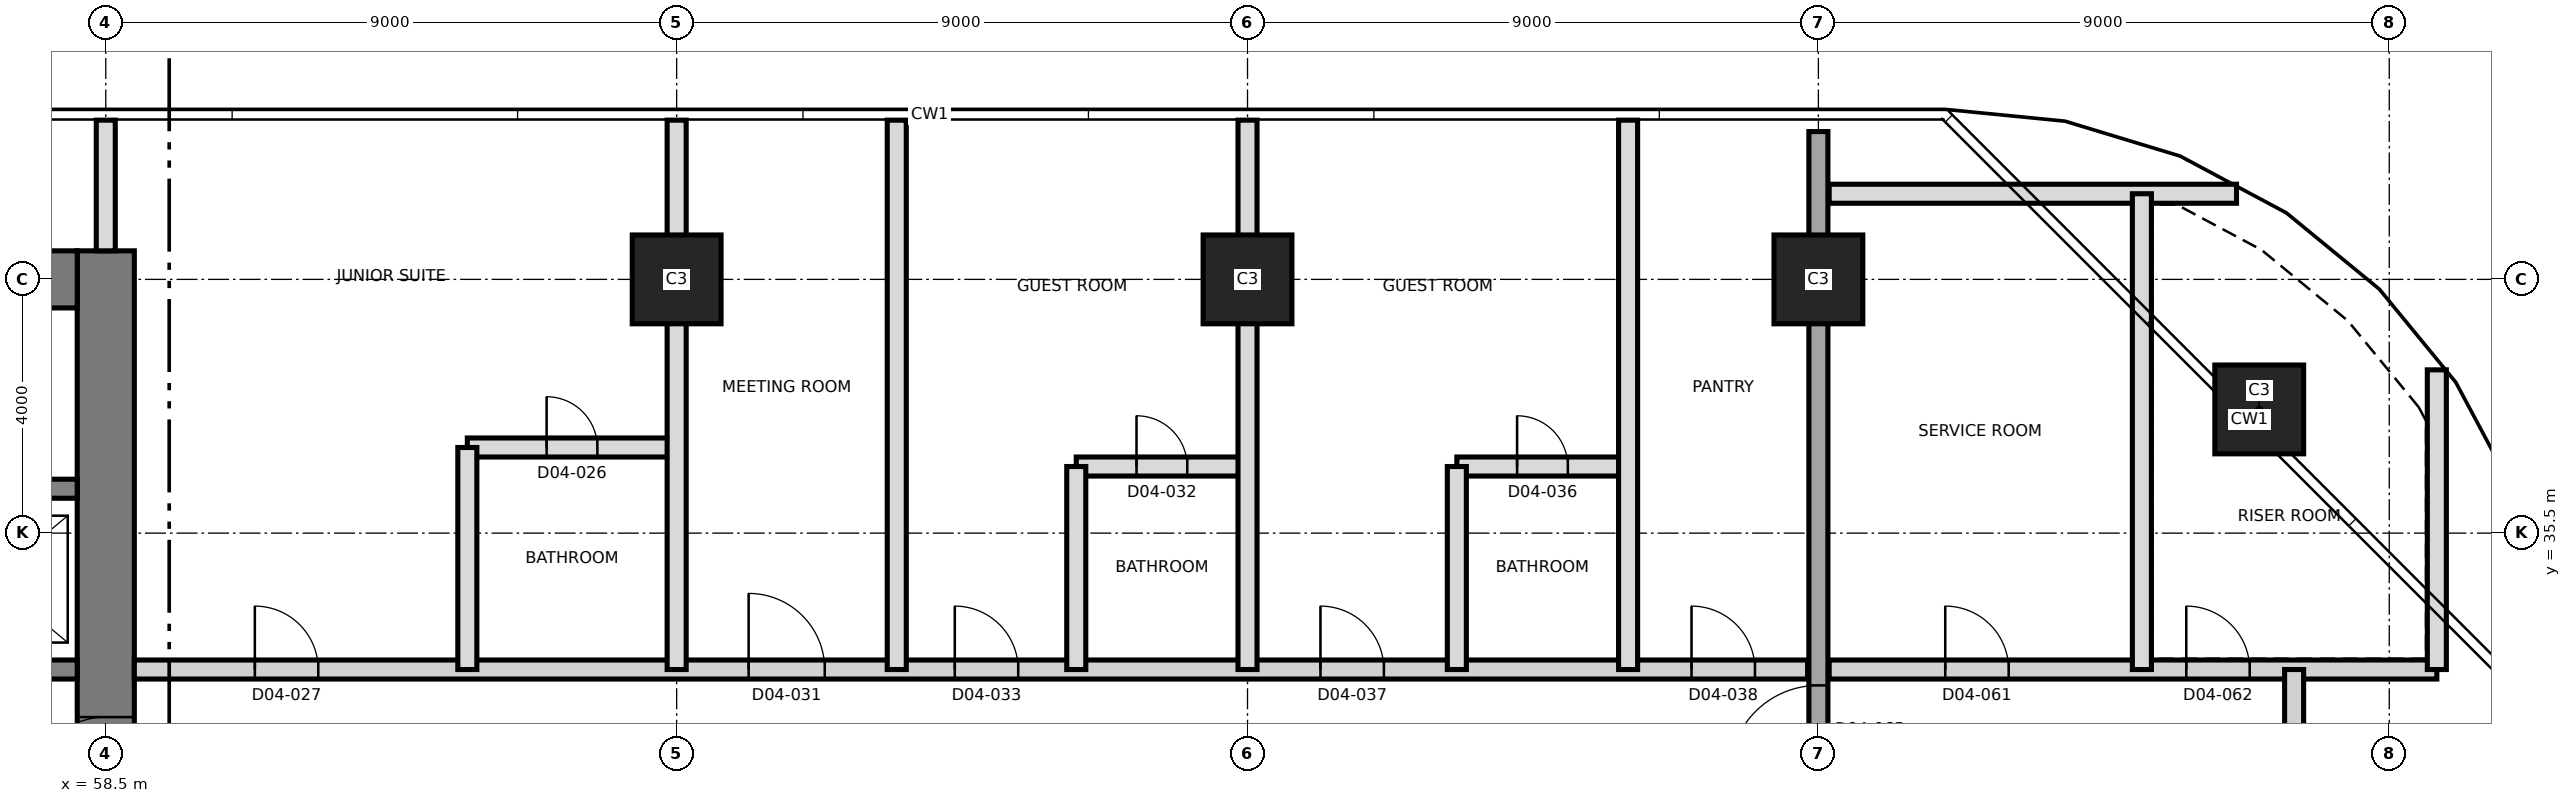
"""IFC4 building model, lengths in metres.
Left out: names, types, materials, properties, quantities, classifications, styles, units other than length and angle.
Written with IfcOpenShell. Run it as: python <this file> out.ifc"""

import sys

from ifc_helpers import new_model, si_unit, direction, frame, frame_2d, origin, origin_2d, place, context, subcontext, project, spatial, rectangle, extrude, element, fill, save


model = new_model("IFC4")
c1 = context("Model", 3, precision=1e-05, world=origin(), true_north=direction((0.0, 1.0)))
c2 = subcontext(c1, "Body", "Model", "MODEL_VIEW")
j1 = project(units=[si_unit("LENGTHUNIT", "METRE"), si_unit("PLANEANGLEUNIT", "RADIAN")], contexts=[c1])
p1 = place(None, origin())
s1 = spatial("IfcSite", under=j1, at=p1, CompositionType="ELEMENT")
p2 = place(p1, origin())
s2 = spatial("IfcBuilding", under=s1, at=p2, CompositionType="ELEMENT")
p3 = place(p2, frame((0.0, 0.0, 63.1)))
s3 = spatial("IfcBuildingStorey", under=s2, at=p3, CompositionType="ELEMENT", Elevation=63.1)
p4 = place(p3, frame((58.5, 21.05, 0.0), z_axis=(0.0, 0.0, 1.0), x_axis=(0.0, 1.0, 0.0)))
e1 = element("IfcWall", 1, at=p4, inside=s3, PredefinedType="SHEAR", context=c2, shape_type="SweptSolid", body=[
    extrude(rectangle(XDim=18.9, YDim=0.9, at=frame_2d((9.45, 0.0))), origin(), (0.0, 0.0, 1.0), 3.7),
])
p5 = place(p4, frame((10.35, 0.0, 0.0)))
e2 = element("IfcOpeningElement", 2, at=p5, cuts=e1, PredefinedType="OPENING", context=c2, shape_type="SweptSolid", body=[
    extrude(rectangle(XDim=1.2, YDim=2.1, at=frame_2d((0.6, 1.05))), frame((0.0, 0.46, 0.0), z_axis=(0.0, -1.0, 0.0), x_axis=(1.0, 0.0, 0.0)), (0.0, 0.0, 1.0), 0.92),
])
p6 = place(p3, frame((31.05, 39.5, 0.0), z_axis=(0.0, 0.0, 1.0), x_axis=(1.0, 0.0, 0.0)))
e3 = element("IfcWall", 3, at=p6, inside=s3, PredefinedType="SHEAR", context=c2, shape_type="SweptSolid", body=[
    extrude(rectangle(XDim=27.0, YDim=0.9, at=frame_2d((13.5, 0.0))), origin(), (0.0, 0.0, 1.0), 3.7),
])
p7 = place(p6, frame((10.65, 0.0, 0.0)))
e4 = element("IfcOpeningElement", 4, at=p7, cuts=e3, PredefinedType="OPENING", context=c2, shape_type="SweptSolid", body=[
    extrude(rectangle(XDim=1.2, YDim=2.1, at=frame_2d((0.6, 1.05))), frame((0.0, 0.46, 0.0), z_axis=(0.0, -1.0, 0.0), x_axis=(1.0, 0.0, 0.0)), (0.0, 0.0, 1.0), 0.92),
])
p8 = place(p3, frame((31.95, 33.35, 0.0), z_axis=(0.0, 0.0, 1.0), x_axis=(1.0, 0.0, 0.0)))
e5 = element("IfcWall", 5, at=p8, inside=s3, PredefinedType="SHEAR", context=c2, shape_type="SweptSolid", body=[
    extrude(rectangle(XDim=26.1, YDim=0.3, at=frame_2d((13.05, 0.0))), origin(), (0.0, 0.0, 1.0), 3.7),
])
p9 = place(p8, frame((13.7, 0.0, 0.0)))
e6 = element("IfcOpeningElement", 6, at=p9, cuts=e5, PredefinedType="OPENING", context=c2, shape_type="SweptSolid", body=[
    extrude(rectangle(XDim=1.4, YDim=2.1, at=frame_2d((0.7, 1.05))), frame((0.0, 0.16, 0.0), z_axis=(0.0, -1.0, 0.0), x_axis=(1.0, 0.0, 0.0)), (0.0, 0.0, 1.0), 0.32),
])
p10 = place(p8, frame((5.175, 0.0, 0.0)))
e7 = element("IfcOpeningElement", 7, at=p10, cuts=e5, PredefinedType="OPENING", context=c2, shape_type="SweptSolid", body=[
    extrude(rectangle(XDim=1.2, YDim=2.1, at=frame_2d((0.6, 1.05))), frame((0.0, 0.16, 0.0), z_axis=(0.0, -1.0, 0.0), x_axis=(1.0, 0.0, 0.0)), (0.0, 0.0, 1.0), 0.32),
])
p11 = place(p8, frame((19.725, 0.0, 0.0)))
e8 = element("IfcOpeningElement", 8, at=p11, cuts=e5, PredefinedType="OPENING", context=c2, shape_type="SweptSolid", body=[
    extrude(rectangle(XDim=1.2, YDim=2.1, at=frame_2d((0.6, 1.05))), frame((0.0, 0.16, 0.0), z_axis=(0.0, -1.0, 0.0), x_axis=(1.0, 0.0, 0.0)), (0.0, 0.0, 1.0), 0.32),
])
p12 = place(p3, frame((43.5, 36.2, 0.0), z_axis=(0.0, 0.0, 1.0), x_axis=(1.0, 0.0, 0.0)))
e9 = element("IfcWall", 9, at=p12, inside=s3, PredefinedType="SHEAR", context=c2, shape_type="SweptSolid", body=[
    extrude(rectangle(XDim=14.55, YDim=0.3, at=frame_2d((7.275, 0.0))), origin(), (0.0, 0.0, 1.0), 3.7),
])
p13 = place(p12, frame((6.9, 0.0, 0.0)))
e10 = element("IfcOpeningElement", 10, at=p13, cuts=e9, PredefinedType="OPENING", context=c2, shape_type="SweptSolid", body=[
    extrude(rectangle(XDim=1.2, YDim=2.1, at=frame_2d((0.6, 1.05))), frame((0.0, 0.16, 0.0), z_axis=(0.0, -1.0, 0.0), x_axis=(1.0, 0.0, 0.0)), (0.0, 0.0, 1.0), 0.32),
])
p14 = place(p12, frame((0.7, 0.0, 0.0)))
e11 = element("IfcOpeningElement", 11, at=p14, cuts=e9, PredefinedType="OPENING", context=c2, shape_type="SweptSolid", body=[
    extrude(rectangle(XDim=1.3, YDim=2.4, at=frame_2d((0.65, 1.2))), frame((0.0, 0.16, 0.0), z_axis=(0.0, -1.0, 0.0), x_axis=(1.0, 0.0, 0.0)), (0.0, 0.0, 1.0), 0.32),
])
p15 = place(p12, frame((3.7, 0.0, 0.0)))
e12 = element("IfcOpeningElement", 12, at=p15, cuts=e9, PredefinedType="OPENING", context=c2, shape_type="SweptSolid", body=[
    extrude(rectangle(XDim=1.3, YDim=2.4, at=frame_2d((0.65, 1.2))), frame((0.0, 0.16, 0.0), z_axis=(0.0, -1.0, 0.0), x_axis=(1.0, 0.0, 0.0)), (0.0, 0.0, 1.0), 0.32),
])
for number, where, z_axis, x_axis in (
    (13, (92.45, 37.45, 0.0), (0.0, 0.0, 1.0), (1.0, 0.0, 0.0)),
    (14, (67.5, 39.5, 0.0), (0.0, 0.0, 1.0), (1.0, 0.0, 0.0)),
    (15, (76.5, 39.5, 0.0), (0.0, 0.0, 1.0), (1.0, 0.0, 0.0)),
    (16, (85.5, 39.5, 0.0), (0.0, 0.0, 1.0), (1.0, 0.0, 0.0)),
):
    element("IfcColumn", number, at=place(p3, frame(where, z_axis=z_axis, x_axis=x_axis)), inside=s3, PredefinedType="COLUMN", context=c2, shape_type="SweptSolid", body=[
        extrude(rectangle(XDim=1.4, YDim=1.4, at=origin_2d()), origin(), (0.0, 0.0, 1.0), 3.7),
    ])
p16 = place(p3, frame((85.5, 19.17, 0.0), z_axis=(0.0, 0.0, 1.0), x_axis=(0.0, 1.0, 0.0)))
e17 = element("IfcWall", 17, at=p16, inside=s3, PredefinedType="SHEAR", context=c2, shape_type="SweptSolid", body=[
    extrude(rectangle(XDim=22.66, YDim=0.3, at=frame_2d((11.33, 0.0))), origin(), (0.0, 0.0, 1.0), 3.7),
])
p17 = place(p16, frame((12.53, 0.0, 0.0)))
e18 = element("IfcOpeningElement", 18, at=p17, cuts=e17, PredefinedType="OPENING", context=c2, shape_type="SweptSolid", body=[
    extrude(rectangle(XDim=1.4, YDim=2.1, at=frame_2d((0.7, 1.05))), frame((0.0, 0.16, 0.0), z_axis=(0.0, -1.0, 0.0), x_axis=(1.0, 0.0, 0.0)), (0.0, 0.0, 1.0), 0.32),
])
p18 = place(p3, frame((58.95, 33.35, 0.0), z_axis=(0.0, 0.0, 1.0), x_axis=(1.0, 0.0, 0.0)))
e19 = element("IfcWall", 19, at=p18, inside=s3, PredefinedType="PARTITIONING", context=c2, shape_type="SweptSolid", body=[
    extrude(rectangle(XDim=26.38, YDim=0.3, at=frame_2d((13.19, 0.0))), origin(), (0.0, 0.0, 1.0), 3.4),
])
p19 = place(p18, frame((1.9, 0.0, 0.0)))
e20 = element("IfcOpeningElement", 20, at=p19, cuts=e19, PredefinedType="OPENING", context=c2, shape_type="SweptSolid", body=[
    extrude(rectangle(XDim=1.0, YDim=2.4, at=frame_2d((0.5, 1.2))), frame((0.0, 0.16, 0.0), z_axis=(0.0, -1.0, 0.0), x_axis=(1.0, 0.0, 0.0)), (0.0, 0.0, 1.0), 0.32),
])
p20 = place(p18, frame((9.685, 0.0, 0.0)))
e21 = element("IfcOpeningElement", 21, at=p20, cuts=e19, PredefinedType="OPENING", context=c2, shape_type="SweptSolid", body=[
    extrude(rectangle(XDim=1.2, YDim=2.1, at=frame_2d((0.6, 1.05))), frame((0.0, 0.16, 0.0), z_axis=(0.0, -1.0, 0.0), x_axis=(1.0, 0.0, 0.0)), (0.0, 0.0, 1.0), 0.32),
])
p21 = place(p18, frame((12.935, 0.0, 0.0)))
e22 = element("IfcOpeningElement", 22, at=p21, cuts=e19, PredefinedType="OPENING", context=c2, shape_type="SweptSolid", body=[
    extrude(rectangle(XDim=1.0, YDim=2.1, at=frame_2d((0.5, 1.05))), frame((0.0, 0.16, 0.0), z_axis=(0.0, -1.0, 0.0), x_axis=(1.0, 0.0, 0.0)), (0.0, 0.0, 1.0), 0.32),
])
p22 = place(p18, frame((18.7, 0.0, 0.0)))
e23 = element("IfcOpeningElement", 23, at=p22, cuts=e19, PredefinedType="OPENING", context=c2, shape_type="SweptSolid", body=[
    extrude(rectangle(XDim=1.0, YDim=2.1, at=frame_2d((0.5, 1.05))), frame((0.0, 0.16, 0.0), z_axis=(0.0, -1.0, 0.0), x_axis=(1.0, 0.0, 0.0)), (0.0, 0.0, 1.0), 0.32),
])
p23 = place(p18, frame((24.55, 0.0, 0.0)))
e24 = element("IfcOpeningElement", 24, at=p23, cuts=e19, PredefinedType="OPENING", context=c2, shape_type="SweptSolid", body=[
    extrude(rectangle(XDim=1.0, YDim=2.1, at=frame_2d((0.5, 1.05))), frame((0.0, 0.16, 0.0), z_axis=(0.0, -1.0, 0.0), x_axis=(1.0, 0.0, 0.0)), (0.0, 0.0, 1.0), 0.32),
])
p24 = place(p3, frame((85.67, 33.35, 0.0), z_axis=(0.0, 0.0, 1.0), x_axis=(1.0, 0.0, 0.0)))
e25 = element("IfcWall", 25, at=p24, inside=s3, PredefinedType="PARTITIONING", context=c2, shape_type="SweptSolid", body=[
    extrude(rectangle(XDim=9.58, YDim=0.3, at=frame_2d((4.79, 0.0))), origin(), (0.0, 0.0, 1.0), 3.4),
])
p25 = place(p24, frame((1.83, 0.0, 0.0)))
e26 = element("IfcOpeningElement", 26, at=p25, cuts=e25, PredefinedType="OPENING", context=c2, shape_type="SweptSolid", body=[
    extrude(rectangle(XDim=1.0, YDim=2.1, at=frame_2d((0.5, 1.05))), frame((0.0, 0.16, 0.0), z_axis=(0.0, -1.0, 0.0), x_axis=(1.0, 0.0, 0.0)), (0.0, 0.0, 1.0), 0.32),
])
p26 = place(p24, frame((5.63, 0.0, 0.0)))
e27 = element("IfcOpeningElement", 27, at=p26, cuts=e25, PredefinedType="OPENING", context=c2, shape_type="SweptSolid", body=[
    extrude(rectangle(XDim=1.0, YDim=2.1, at=frame_2d((0.5, 1.05))), frame((0.0, 0.16, 0.0), z_axis=(0.0, -1.0, 0.0), x_axis=(1.0, 0.0, 0.0)), (0.0, 0.0, 1.0), 0.32),
])
p27 = place(p3, frame((73.8, 36.55, 0.0), z_axis=(0.0, 0.0, 1.0), x_axis=(1.0, 0.0, 0.0)))
e28 = element("IfcWall", 28, at=p27, inside=s3, PredefinedType="PARTITIONING", context=c2, shape_type="SweptSolid", body=[
    extrude(rectangle(XDim=2.7, YDim=0.3, at=frame_2d((1.35, 0.0))), origin(), (0.0, 0.0, 1.0), 3.4),
])
p28 = place(p27, frame((0.95, 0.0, 0.0)))
e29 = element("IfcOpeningElement", 29, at=p28, cuts=e28, PredefinedType="OPENING", context=c2, shape_type="SweptSolid", body=[
    extrude(rectangle(XDim=0.8, YDim=2.1, at=frame_2d((0.4, 1.05))), frame((0.0, 0.16, 0.0), z_axis=(0.0, -1.0, 0.0), x_axis=(1.0, 0.0, 0.0)), (0.0, 0.0, 1.0), 0.32),
])
p29 = place(p3, frame((79.8, 36.55, 0.0), z_axis=(0.0, 0.0, 1.0), x_axis=(1.0, 0.0, 0.0)))
e30 = element("IfcWall", 30, at=p29, inside=s3, PredefinedType="PARTITIONING", context=c2, shape_type="SweptSolid", body=[
    extrude(rectangle(XDim=2.7, YDim=0.3, at=frame_2d((1.35, 0.0))), origin(), (0.0, 0.0, 1.0), 3.4),
])
p30 = place(p29, frame((0.95, 0.0, 0.0)))
e31 = element("IfcOpeningElement", 31, at=p30, cuts=e30, PredefinedType="OPENING", context=c2, shape_type="SweptSolid", body=[
    extrude(rectangle(XDim=0.8, YDim=2.1, at=frame_2d((0.4, 1.05))), frame((0.0, 0.16, 0.0), z_axis=(0.0, -1.0, 0.0), x_axis=(1.0, 0.0, 0.0)), (0.0, 0.0, 1.0), 0.32),
])
p31 = place(p3, frame((64.2, 36.85, 0.0), z_axis=(0.0, 0.0, 1.0), x_axis=(1.0, 0.0, 0.0)))
e32 = element("IfcWall", 32, at=p31, inside=s3, PredefinedType="PARTITIONING", context=c2, shape_type="SweptSolid", body=[
    extrude(rectangle(XDim=3.3, YDim=0.3, at=frame_2d((1.65, 0.0))), origin(), (0.0, 0.0, 1.0), 3.4),
])
p32 = place(p31, frame((1.25, 0.0, 0.0)))
e33 = element("IfcOpeningElement", 33, at=p32, cuts=e32, PredefinedType="OPENING", context=c2, shape_type="SweptSolid", body=[
    extrude(rectangle(XDim=0.8, YDim=2.1, at=frame_2d((0.4, 1.05))), frame((0.0, 0.16, 0.0), z_axis=(0.0, -1.0, 0.0), x_axis=(1.0, 0.0, 0.0)), (0.0, 0.0, 1.0), 0.32),
])
p33 = place(p3, frame((85.67, 40.85, 0.0), z_axis=(0.0, 0.0, 1.0), x_axis=(1.0, 0.0, 0.0)))
e34 = element("IfcWall", 34, at=p33, inside=s3, PredefinedType="PARTITIONING", context=c2, shape_type="SweptSolid", body=[
    extrude(rectangle(XDim=6.422, YDim=0.3, at=frame_2d((3.211, 0.0))), origin(), (0.0, 0.0, 1.0), 3.4),
])
p34 = place(p3, frame((58.5, 39.95, 0.0), z_axis=(0.0, 0.0, 1.0), x_axis=(0.0, 1.0, 0.0)))
e35 = element("IfcWall", 35, at=p34, inside=s3, PredefinedType="PARTITIONING", context=c2, shape_type="SweptSolid", body=[
    extrude(rectangle(XDim=2.06, YDim=0.3, at=frame_2d((1.03, 0.0))), origin(), (0.0, 0.0, 1.0), 3.4),
])
p35 = place(p3, frame((64.2, 33.35, 0.0), z_axis=(0.0, 0.0, 1.0), x_axis=(0.0, 1.0, 0.0)))
e36 = element("IfcWall", 36, at=p35, inside=s3, PredefinedType="PARTITIONING", context=c2, shape_type="SweptSolid", body=[
    extrude(rectangle(XDim=3.5, YDim=0.3, at=frame_2d((1.75, 0.0))), origin(), (0.0, 0.0, 1.0), 3.4),
])
for number, where, z_axis, x_axis in (
    (37, (67.5, 33.35, 0.0), (0.0, 0.0, 1.0), (0.0, 1.0, 0.0)),
    (38, (70.97, 33.35, 0.0), (0.0, 0.0, 1.0), (0.0, 1.0, 0.0)),
):
    element("IfcWall", number, at=place(p3, frame(where, z_axis=z_axis, x_axis=x_axis)), inside=s3, PredefinedType="PARTITIONING", context=c2, shape_type="SweptSolid", body=[
        extrude(rectangle(XDim=8.66, YDim=0.3, at=frame_2d((4.33, 0.0))), origin(), (0.0, 0.0, 1.0), 3.4),
    ])
p36 = place(p3, frame((73.8, 33.35, 0.0), z_axis=(0.0, 0.0, 1.0), x_axis=(0.0, 1.0, 0.0)))
e39 = element("IfcWall", 39, at=p36, inside=s3, PredefinedType="PARTITIONING", context=c2, shape_type="SweptSolid", body=[
    extrude(rectangle(XDim=3.2, YDim=0.3, at=frame_2d((1.6, 0.0))), origin(), (0.0, 0.0, 1.0), 3.4),
])
p37 = place(p3, frame((76.5, 33.35, 0.0), z_axis=(0.0, 0.0, 1.0), x_axis=(0.0, 1.0, 0.0)))
e40 = element("IfcWall", 40, at=p37, inside=s3, PredefinedType="PARTITIONING", context=c2, shape_type="SweptSolid", body=[
    extrude(rectangle(XDim=8.66, YDim=0.3, at=frame_2d((4.33, 0.0))), origin(), (0.0, 0.0, 1.0), 3.4),
])
p38 = place(p3, frame((79.8, 33.35, 0.0), z_axis=(0.0, 0.0, 1.0), x_axis=(0.0, 1.0, 0.0)))
e41 = element("IfcWall", 41, at=p38, inside=s3, PredefinedType="PARTITIONING", context=c2, shape_type="SweptSolid", body=[
    extrude(rectangle(XDim=3.2, YDim=0.3, at=frame_2d((1.6, 0.0))), origin(), (0.0, 0.0, 1.0), 3.4),
])
p39 = place(p3, frame((82.5, 33.35, 0.0), z_axis=(0.0, 0.0, 1.0), x_axis=(0.0, 1.0, 0.0)))
e42 = element("IfcWall", 42, at=p39, inside=s3, PredefinedType="PARTITIONING", context=c2, shape_type="SweptSolid", body=[
    extrude(rectangle(XDim=8.66, YDim=0.3, at=frame_2d((4.33, 0.0))), origin(), (0.0, 0.0, 1.0), 3.4),
])
p40 = place(p3, frame((90.6, 33.35, 0.0), z_axis=(0.0, 0.0, 1.0), x_axis=(0.0, 1.0, 0.0)))
e43 = element("IfcWall", 43, at=p40, inside=s3, PredefinedType="PARTITIONING", context=c2, shape_type="SweptSolid", body=[
    extrude(rectangle(XDim=7.5, YDim=0.3, at=frame_2d((3.75, 0.0))), origin(), (0.0, 0.0, 1.0), 3.4),
])
p41 = place(p3, frame((93.0, 30.65, 0.0), z_axis=(0.0, 0.0, 1.0), x_axis=(0.0, 1.0, 0.0)))
e44 = element("IfcWall", 44, at=p41, inside=s3, PredefinedType="PARTITIONING", context=c2, shape_type="SweptSolid", body=[
    extrude(rectangle(XDim=2.7, YDim=0.3, at=frame_2d((1.35, 0.0))), origin(), (0.0, 0.0, 1.0), 3.4),
])
p42 = place(p3, frame((95.25, 33.35, 0.0), z_axis=(0.0, 0.0, 1.0), x_axis=(0.0, 1.0, 0.0)))
e45 = element("IfcWall", 45, at=p42, inside=s3, PredefinedType="PARTITIONING", context=c2, shape_type="SweptSolid", body=[
    extrude(rectangle(XDim=4.724, YDim=0.3, at=frame_2d((2.362, 0.0))), origin(), (0.0, 0.0, 1.0), 3.4),
])
p43 = place(p5, origin())
e46 = element("IfcDoor", 46, at=p43, inside=s3, OperationType="SINGLE_SWING_LEFT", PredefinedType="DOOR", context=c2, shape_type="SweptSolid", body=[
    extrude(rectangle(XDim=1.2, YDim=2.1, at=frame_2d((0.6, 1.05))), frame((0.0, 0.025, 0.0), z_axis=(0.0, -1.0, 0.0), x_axis=(1.0, 0.0, 0.0)), (0.0, 0.0, 1.0), 0.05),
])
fill(e2, e46)
p44 = place(p32, origin())
e47 = element("IfcDoor", 47, at=p44, inside=s3, OperationType="SINGLE_SWING_LEFT", PredefinedType="DOOR", context=c2, shape_type="SweptSolid", body=[
    extrude(rectangle(XDim=0.8, YDim=2.1, at=frame_2d((0.4, 1.05))), frame((0.0, 0.025, 0.0), z_axis=(0.0, -1.0, 0.0), x_axis=(1.0, 0.0, 0.0)), (0.0, 0.0, 1.0), 0.05),
])
fill(e33, e47)
p45 = place(p19, origin())
e48 = element("IfcDoor", 48, at=p45, inside=s3, OperationType="SINGLE_SWING_LEFT", PredefinedType="DOOR", context=c2, shape_type="SweptSolid", body=[
    extrude(rectangle(XDim=1.0, YDim=2.4, at=frame_2d((0.5, 1.2))), frame((0.0, 0.025, 0.0), z_axis=(0.0, -1.0, 0.0), x_axis=(1.0, 0.0, 0.0)), (0.0, 0.0, 1.0), 0.05),
])
fill(e20, e48)
p46 = place(p20, origin())
e49 = element("IfcDoor", 49, at=p46, inside=s3, OperationType="SINGLE_SWING_RIGHT", PredefinedType="DOOR", context=c2, shape_type="SweptSolid", body=[
    extrude(rectangle(XDim=1.2, YDim=2.1, at=frame_2d((0.6, 1.05))), frame((0.0, 0.025, 0.0), z_axis=(0.0, -1.0, 0.0), x_axis=(1.0, 0.0, 0.0)), (0.0, 0.0, 1.0), 0.05),
])
fill(e21, e49)
p47 = place(p28, origin())
e50 = element("IfcDoor", 50, at=p47, inside=s3, OperationType="SINGLE_SWING_LEFT", PredefinedType="DOOR", context=c2, shape_type="SweptSolid", body=[
    extrude(rectangle(XDim=0.8, YDim=2.1, at=frame_2d((0.4, 1.05))), frame((0.0, 0.025, 0.0), z_axis=(0.0, -1.0, 0.0), x_axis=(1.0, 0.0, 0.0)), (0.0, 0.0, 1.0), 0.05),
])
fill(e29, e50)
p48 = place(p21, origin())
e51 = element("IfcDoor", 51, at=p48, inside=s3, OperationType="SINGLE_SWING_LEFT", PredefinedType="DOOR", context=c2, shape_type="SweptSolid", body=[
    extrude(rectangle(XDim=1.0, YDim=2.1, at=frame_2d((0.5, 1.05))), frame((0.0, 0.025, 0.0), z_axis=(0.0, -1.0, 0.0), x_axis=(1.0, 0.0, 0.0)), (0.0, 0.0, 1.0), 0.05),
])
fill(e22, e51)
p49 = place(p30, origin())
e52 = element("IfcDoor", 52, at=p49, inside=s3, OperationType="SINGLE_SWING_RIGHT", PredefinedType="DOOR", context=c2, shape_type="SweptSolid", body=[
    extrude(rectangle(XDim=0.8, YDim=2.1, at=frame_2d((0.4, 1.05))), frame((0.0, 0.025, 0.0), z_axis=(0.0, -1.0, 0.0), x_axis=(1.0, 0.0, 0.0)), (0.0, 0.0, 1.0), 0.05),
])
fill(e31, e52)
p50 = place(p22, origin())
e53 = element("IfcDoor", 53, at=p50, inside=s3, OperationType="SINGLE_SWING_LEFT", PredefinedType="DOOR", context=c2, shape_type="SweptSolid", body=[
    extrude(rectangle(XDim=1.0, YDim=2.1, at=frame_2d((0.5, 1.05))), frame((0.0, 0.025, 0.0), z_axis=(0.0, -1.0, 0.0), x_axis=(1.0, 0.0, 0.0)), (0.0, 0.0, 1.0), 0.05),
])
fill(e23, e53)
p51 = place(p23, origin())
e54 = element("IfcDoor", 54, at=p51, inside=s3, OperationType="SINGLE_SWING_LEFT", PredefinedType="DOOR", context=c2, shape_type="SweptSolid", body=[
    extrude(rectangle(XDim=1.0, YDim=2.1, at=frame_2d((0.5, 1.05))), frame((0.0, 0.025, 0.0), z_axis=(0.0, -1.0, 0.0), x_axis=(1.0, 0.0, 0.0)), (0.0, 0.0, 1.0), 0.05),
])
fill(e24, e54)
p52 = place(p25, origin())
e55 = element("IfcDoor", 55, at=p52, inside=s3, OperationType="SINGLE_SWING_LEFT", PredefinedType="DOOR", context=c2, shape_type="SweptSolid", body=[
    extrude(rectangle(XDim=1.0, YDim=2.1, at=frame_2d((0.5, 1.05))), frame((0.0, 0.025, 0.0), z_axis=(0.0, -1.0, 0.0), x_axis=(1.0, 0.0, 0.0)), (0.0, 0.0, 1.0), 0.05),
])
fill(e26, e55)
p53 = place(p26, origin())
e56 = element("IfcDoor", 56, at=p53, inside=s3, OperationType="SINGLE_SWING_RIGHT", PredefinedType="DOOR", context=c2, shape_type="SweptSolid", body=[
    extrude(rectangle(XDim=1.0, YDim=2.1, at=frame_2d((0.5, 1.05))), frame((0.0, 0.025, 0.0), z_axis=(0.0, -1.0, 0.0), x_axis=(1.0, 0.0, 0.0)), (0.0, 0.0, 1.0), 0.05),
])
fill(e27, e56)
p54 = place(p17, origin())
e57 = element("IfcDoor", 57, at=p54, inside=s3, OperationType="SINGLE_SWING_RIGHT", PredefinedType="DOOR", context=c2, shape_type="SweptSolid", body=[
    extrude(rectangle(XDim=1.4, YDim=2.1, at=frame_2d((0.7, 1.05))), frame((0.0, 0.025, 0.0), z_axis=(0.0, -1.0, 0.0), x_axis=(1.0, 0.0, 0.0)), (0.0, 0.0, 1.0), 0.05),
])
fill(e18, e57)
save(model, sys.argv[1])
